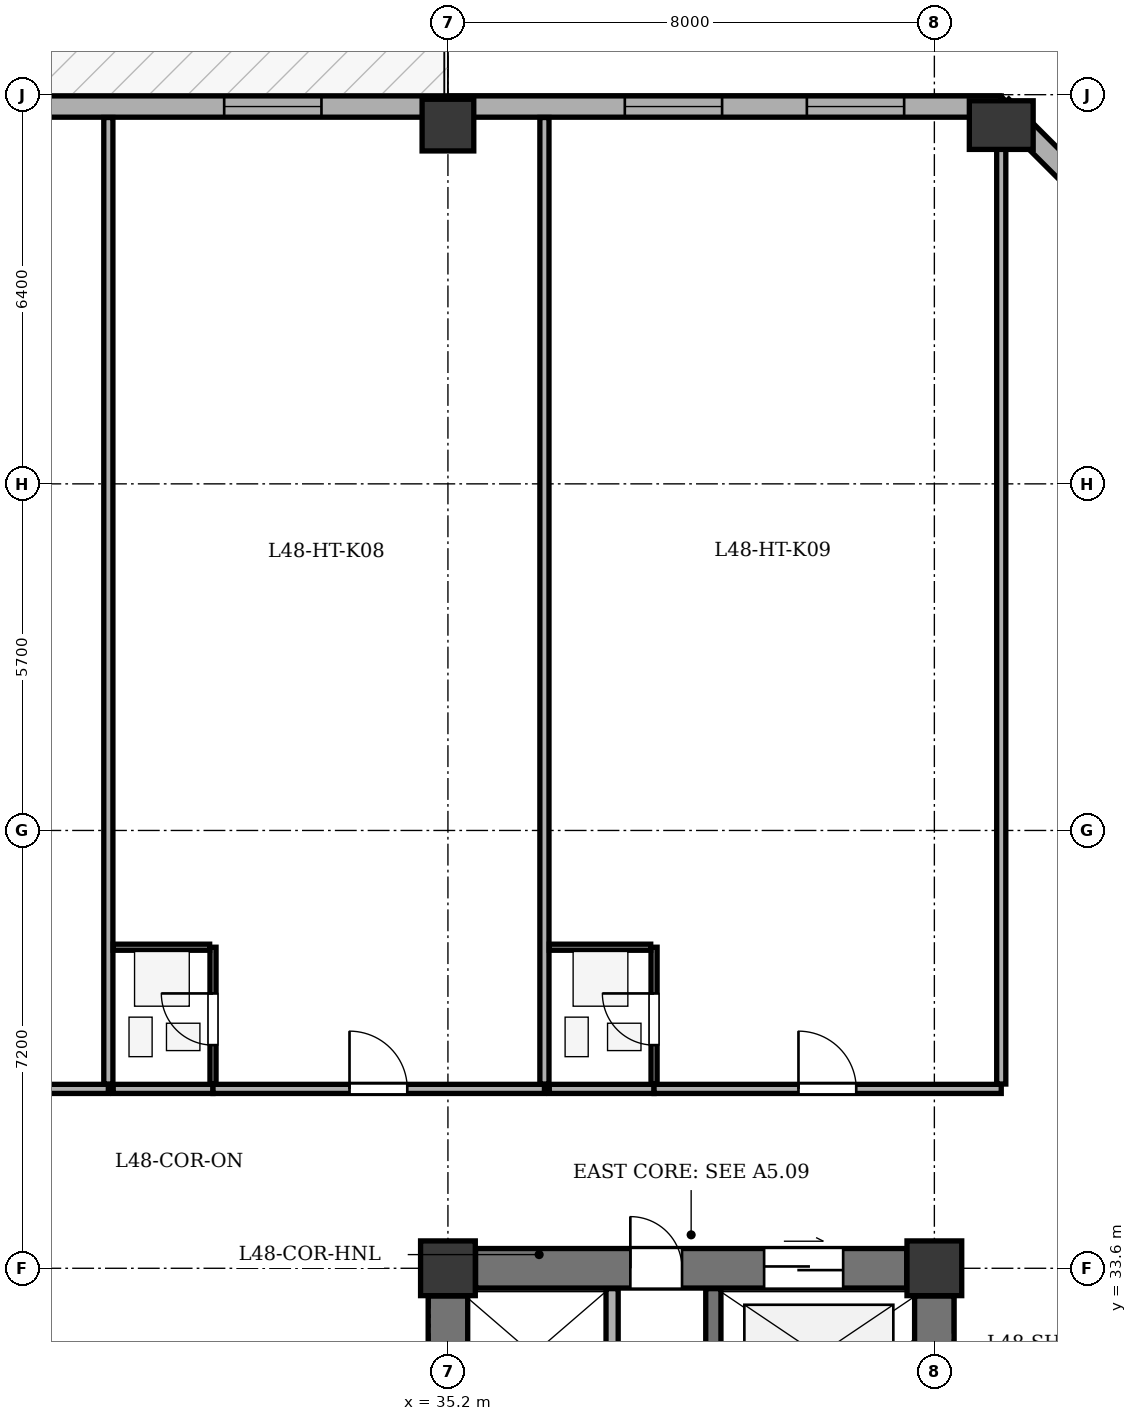
"""IFC4 building model, lengths in metres.
Left out: names, types, materials, properties, quantities, classifications, styles, units other than length and angle.
Written with IfcOpenShell. Run it as: python <this file> out.ifc"""

import sys

from ifc_helpers import new_model, si_unit, direction, frame, frame_2d, origin, origin_2d, place, context, subcontext, project, spatial, rectangle, extrude, element, fill, save


model = new_model("IFC4")
c1 = context("Model", 3, precision=1e-05, world=origin(), true_north=direction((0.0, 1.0)))
c2 = subcontext(c1, "Body", "Model", "MODEL_VIEW")
j1 = project(units=[si_unit("LENGTHUNIT", "METRE"), si_unit("PLANEANGLEUNIT", "RADIAN")], contexts=[c1])
p1 = place(None, origin())
s1 = spatial("IfcSite", under=j1, at=p1, CompositionType="ELEMENT")
p2 = place(p1, origin())
s2 = spatial("IfcBuilding", under=s1, at=p2, CompositionType="ELEMENT")
p3 = place(p2, frame((0.0, 0.0, 186.8)))
s3 = spatial("IfcBuildingStorey", under=s2, at=p3, CompositionType="ELEMENT", Elevation=186.8)
for number, where, z_axis, x_axis in (
    (1, (35.2, 33.6, 0.0), (0.0, 0.0, 1.0), (1.0, 0.0, 0.0)),
    (2, (43.2, 33.6, 0.0), (0.0, 0.0, 1.0), (1.0, 0.0, 0.0)),
):
    element("IfcColumn", number, at=place(p3, frame(where, z_axis=z_axis, x_axis=x_axis)), inside=s3, PredefinedType="COLUMN", context=c2, shape_type="SweptSolid", body=[
        extrude(rectangle(XDim=0.9, YDim=0.9, at=origin_2d()), origin(), (0.0, 0.0, 1.0), 3.5),
    ])
p4 = place(p3, frame((35.2, 52.4, 0.0), z_axis=(0.0, 0.0, 1.0), x_axis=(1.0, 0.0, 0.0)))
e3 = element("IfcColumn", 3, at=p4, inside=s3, PredefinedType="COLUMN", context=c2, shape_type="SweptSolid", body=[
    extrude(rectangle(XDim=0.85, YDim=0.85, at=origin_2d()), origin(), (0.0, 0.0, 1.0), 3.5),
])
p5 = place(p3, frame((44.3, 52.4, 0.0), z_axis=(0.0, 0.0, 1.0), x_axis=(1.0, 0.0, 0.0)))
e4 = element("IfcColumn", 4, at=p5, inside=s3, PredefinedType="COLUMN", context=c2, shape_type="SweptSolid", body=[
    extrude(rectangle(XDim=0.8, YDim=1.05, at=origin_2d()), origin(), (0.0, 0.0, 1.0), 3.5),
])
p6 = place(p3, frame((9.3, 52.705, 0.0), z_axis=(0.0, 0.0, 1.0), x_axis=(1.0, 0.0, 0.0)))
e5 = element("IfcWall", 5, at=p6, inside=s3, PredefinedType="STANDARD", context=c2, shape_type="SweptSolid", body=[
    extrude(rectangle(XDim=35.0, YDim=0.35, at=frame_2d((17.5, 0.0))), origin(), (0.0, 0.0, 1.0), 2.785),
])
p7 = place(p6, frame((14.4, 0.0, 0.0)))
e6 = element("IfcOpeningElement", 6, at=p7, cuts=e5, PredefinedType="OPENING", context=c2, shape_type="SweptSolid", body=[
    extrude(rectangle(XDim=1.0, YDim=2.02, at=frame_2d((0.5, 1.01))), frame((0.0, 0.185, 0.0), z_axis=(0.0, -1.0, 0.0), x_axis=(1.0, 0.0, 0.0)), (0.0, 0.0, 1.0), 0.37),
])
p8 = place(p6, frame((3.123, 0.0, 0.75)))
e7 = element("IfcOpeningElement", 7, at=p8, cuts=e5, PredefinedType="OPENING", context=c2, shape_type="SweptSolid", body=[
    extrude(rectangle(XDim=1.6, YDim=1.75, at=frame_2d((0.8, 0.875))), frame((0.0, 0.185, 0.0), z_axis=(0.0, -1.0, 0.0), x_axis=(1.0, 0.0, 0.0)), (0.0, 0.0, 1.0), 0.37),
])
p9 = place(p6, frame((8.361, 0.0, 0.75)))
e8 = element("IfcOpeningElement", 8, at=p9, cuts=e5, PredefinedType="OPENING", context=c2, shape_type="SweptSolid", body=[
    extrude(rectangle(XDim=1.6, YDim=1.75, at=frame_2d((0.8, 0.875))), frame((0.0, 0.185, 0.0), z_axis=(0.0, -1.0, 0.0), x_axis=(1.0, 0.0, 0.0)), (0.0, 0.0, 1.0), 0.37),
])
p10 = place(p6, frame((22.22, 0.0, 0.75)))
e9 = element("IfcOpeningElement", 9, at=p10, cuts=e5, PredefinedType="OPENING", context=c2, shape_type="SweptSolid", body=[
    extrude(rectangle(XDim=1.6, YDim=1.75, at=frame_2d((0.8, 0.875))), frame((0.0, 0.185, 0.0), z_axis=(0.0, -1.0, 0.0), x_axis=(1.0, 0.0, 0.0)), (0.0, 0.0, 1.0), 0.37),
])
p11 = place(p6, frame((28.809, 0.0, 0.75)))
e10 = element("IfcOpeningElement", 10, at=p11, cuts=e5, PredefinedType="OPENING", context=c2, shape_type="SweptSolid", body=[
    extrude(rectangle(XDim=1.6, YDim=1.75, at=frame_2d((0.8, 0.875))), frame((0.0, 0.185, 0.0), z_axis=(0.0, -1.0, 0.0), x_axis=(1.0, 0.0, 0.0)), (0.0, 0.0, 1.0), 0.37),
])
p12 = place(p6, frame((31.803, 0.0, 0.75)))
e11 = element("IfcOpeningElement", 11, at=p12, cuts=e5, PredefinedType="OPENING", context=c2, shape_type="SweptSolid", body=[
    extrude(rectangle(XDim=1.6, YDim=1.75, at=frame_2d((0.8, 0.875))), frame((0.0, 0.185, 0.0), z_axis=(0.0, -1.0, 0.0), x_axis=(1.0, 0.0, 0.0)), (0.0, 0.0, 1.0), 0.37),
])
p13 = place(p3, frame((44.3, 52.705, 0.0), z_axis=(0.0, 0.0, 1.0), x_axis=(0.707088817216, -0.7071247447, 0.0)))
e12 = element("IfcWall", 12, at=p13, inside=s3, PredefinedType="STANDARD", context=c2, shape_type="SweptSolid", body=[
    extrude(rectangle(XDim=6.795, YDim=0.35, at=frame_2d((3.398, 0.0))), origin(), (0.0, 0.0, 1.0), 2.785),
])
p14 = place(p13, frame((2.698, 0.0, 0.75)))
e13 = element("IfcOpeningElement", 13, at=p14, cuts=e12, PredefinedType="OPENING", context=c2, shape_type="SweptSolid", body=[
    extrude(rectangle(XDim=1.4, YDim=1.65, at=frame_2d((0.7, 0.825))), frame((0.0, 0.185, 0.0), z_axis=(0.0, -1.0, 0.0), x_axis=(1.0, 0.0, 0.0)), (0.0, 0.0, 1.0), 0.37),
])
p15 = place(p3, frame((43.2, 21.255, 0.0), z_axis=(0.0, 0.0, 1.0), x_axis=(0.0, 1.0, 0.0)))
e14 = element("IfcWall", 14, at=p15, inside=s3, PredefinedType="SHEAR", context=c2, shape_type="SweptSolid", body=[
    extrude(rectangle(XDim=11.89, YDim=0.65, at=frame_2d((5.945, 0.0))), origin(), (0.0, 0.0, 1.0), 3.2),
])
p16 = place(p3, frame((35.655, 33.6, 0.0), z_axis=(0.0, 0.0, 1.0), x_axis=(1.0, 0.0, 0.0)))
e15 = element("IfcWall", 15, at=p16, inside=s3, PredefinedType="SHEAR", context=c2, shape_type="SweptSolid", body=[
    extrude(rectangle(XDim=7.09, YDim=0.65, at=frame_2d((3.545, 0.0))), origin(), (0.0, 0.0, 1.0), 3.2),
])
p17 = place(p16, frame((4.745, 0.0, 0.0)))
e16 = element("IfcOpeningElement", 16, at=p17, cuts=e15, PredefinedType="OPENING", context=c2, shape_type="SweptSolid", body=[
    extrude(rectangle(XDim=1.3, YDim=2.15, at=frame_2d((0.65, 1.075))), frame((0.0, 0.335, 0.0), z_axis=(0.0, -1.0, 0.0), x_axis=(1.0, 0.0, 0.0)), (0.0, 0.0, 1.0), 0.67),
])
p18 = place(p16, frame((2.545, 0.0, 0.0)))
e17 = element("IfcOpeningElement", 17, at=p18, cuts=e15, PredefinedType="OPENING", context=c2, shape_type="SweptSolid", body=[
    extrude(rectangle(XDim=0.85, YDim=2.02, at=frame_2d((0.425, 1.01))), frame((0.0, 0.335, 0.0), z_axis=(0.0, -1.0, 0.0), x_axis=(1.0, 0.0, 0.0)), (0.0, 0.0, 1.0), 0.67),
])
p19 = place(p3, frame((35.2, 21.255, 0.0), z_axis=(0.0, 0.0, 1.0), x_axis=(0.0, 1.0, 0.0)))
e18 = element("IfcWall", 18, at=p19, inside=s3, PredefinedType="SHEAR", context=c2, shape_type="SweptSolid", body=[
    extrude(rectangle(XDim=11.89, YDim=0.65, at=frame_2d((5.945, 0.0))), origin(), (0.0, 0.0, 1.0), 3.2),
])
p20 = place(p19, frame((1.345, 0.0, 0.0)))
e19 = element("IfcOpeningElement", 19, at=p20, cuts=e18, PredefinedType="OPENING", context=c2, shape_type="SweptSolid", body=[
    extrude(rectangle(XDim=1.2, YDim=2.15, at=frame_2d((0.6, 1.075))), frame((0.0, 0.335, 0.0), z_axis=(0.0, -1.0, 0.0), x_axis=(1.0, 0.0, 0.0)), (0.0, 0.0, 1.0), 0.67),
])
p21 = place(p19, frame((4.345, 0.0, 0.0)))
e20 = element("IfcOpeningElement", 20, at=p21, cuts=e18, PredefinedType="OPENING", context=c2, shape_type="SweptSolid", body=[
    extrude(rectangle(XDim=1.1, YDim=2.1, at=frame_2d((0.55, 1.05))), frame((0.0, 0.335, 0.0), z_axis=(0.0, -1.0, 0.0), x_axis=(1.0, 0.0, 0.0)), (0.0, 0.0, 1.0), 0.67),
])
p22 = place(p19, frame((6.295, 0.0, 0.0)))
e21 = element("IfcOpeningElement", 21, at=p22, cuts=e18, PredefinedType="OPENING", context=c2, shape_type="SweptSolid", body=[
    extrude(rectangle(XDim=1.1, YDim=2.1, at=frame_2d((0.55, 1.05))), frame((0.0, 0.335, 0.0), z_axis=(0.0, -1.0, 0.0), x_axis=(1.0, 0.0, 0.0)), (0.0, 0.0, 1.0), 0.67),
])
p23 = place(p19, frame((8.245, 0.0, 0.0)))
e22 = element("IfcOpeningElement", 22, at=p23, cuts=e18, PredefinedType="OPENING", context=c2, shape_type="SweptSolid", body=[
    extrude(rectangle(XDim=1.1, YDim=2.1, at=frame_2d((0.55, 1.05))), frame((0.0, 0.335, 0.0), z_axis=(0.0, -1.0, 0.0), x_axis=(1.0, 0.0, 0.0)), (0.0, 0.0, 1.0), 0.67),
])
p24 = place(p3, frame((39.565, 21.135, 0.0), z_axis=(0.0, 0.0, 1.0), x_axis=(0.0, 1.0, 0.0)))
e23 = element("IfcWall", 23, at=p24, inside=s3, PredefinedType="SHEAR", context=c2, shape_type="SweptSolid", body=[
    extrude(rectangle(XDim=12.13, YDim=0.25, at=frame_2d((6.065, 0.0))), origin(), (0.0, 0.0, 1.0), 3.2),
])
p25 = place(p24, frame((0.515, 0.0, 0.0)))
e24 = element("IfcOpeningElement", 24, at=p25, cuts=e23, PredefinedType="OPENING", context=c2, shape_type="SweptSolid", body=[
    extrude(rectangle(XDim=1.2, YDim=2.15, at=frame_2d((0.6, 1.075))), frame((0.0, 0.135, 0.0), z_axis=(0.0, -1.0, 0.0), x_axis=(1.0, 0.0, 0.0)), (0.0, 0.0, 1.0), 0.27),
])
p26 = place(p24, frame((2.665, 0.0, 0.0)))
e25 = element("IfcOpeningElement", 25, at=p26, cuts=e23, PredefinedType="OPENING", context=c2, shape_type="SweptSolid", body=[
    extrude(rectangle(XDim=1.15, YDim=2.15, at=frame_2d((0.575, 1.075))), frame((0.0, 0.135, 0.0), z_axis=(0.0, -1.0, 0.0), x_axis=(1.0, 0.0, 0.0)), (0.0, 0.0, 1.0), 0.27),
])
p27 = place(p3, frame((37.9, 25.27, 0.0), z_axis=(0.0, 0.0, 1.0), x_axis=(0.0, 1.0, 0.0)))
e26 = element("IfcWall", 26, at=p27, inside=s3, PredefinedType="SOLIDWALL", context=c2, shape_type="SweptSolid", body=[
    extrude(rectangle(XDim=7.995, YDim=0.2, at=frame_2d((3.998, 0.0))), origin(), (0.0, 0.0, 1.0), 3.2),
])
p28 = place(p3, frame((24.435, 36.55, 0.0), z_axis=(0.0, 0.0, 1.0), x_axis=(1.0, 0.0, 0.0)))
e27 = element("IfcWall", 27, at=p28, inside=s3, PredefinedType="PARTITIONING", context=c2, shape_type="SweptSolid", body=[
    extrude(rectangle(XDim=5.18, YDim=0.15, at=frame_2d((2.59, 0.0))), origin(), (0.0, 0.0, 1.0), 3.2),
])
p29 = place(p28, frame((2.11, 0.0, 0.0)))
e28 = element("IfcOpeningElement", 28, at=p29, cuts=e27, PredefinedType="OPENING", context=c2, shape_type="SweptSolid", body=[
    extrude(rectangle(XDim=0.95, YDim=2.1, at=frame_2d((0.475, 1.05))), frame((0.0, 0.085, 0.0), z_axis=(0.0, -1.0, 0.0), x_axis=(1.0, 0.0, 0.0)), (0.0, 0.0, 1.0), 0.17),
])
p30 = place(p3, frame((29.615, 36.63, 0.0), z_axis=(0.0, 0.0, 1.0), x_axis=(0.0, 1.0, 0.0)))
e29 = element("IfcWall", 29, at=p30, inside=s3, PredefinedType="PARTITIONING", context=c2, shape_type="SweptSolid", body=[
    extrude(rectangle(XDim=15.895, YDim=0.15, at=frame_2d((7.948, 0.0))), origin(), (0.0, 0.0, 1.0), 2.785),
])
p31 = place(p3, frame((29.695, 36.55, 0.0), z_axis=(0.0, 0.0, 1.0), x_axis=(1.0, 0.0, 0.0)))
e30 = element("IfcWall", 30, at=p31, inside=s3, PredefinedType="PARTITIONING", context=c2, shape_type="SweptSolid", body=[
    extrude(rectangle(XDim=1.641, YDim=0.15, at=frame_2d((0.821, 0.0))), origin(), (0.0, 0.0, 1.0), 3.2),
])
p32 = place(p3, frame((31.336, 36.55, 0.0), z_axis=(0.0, 0.0, 1.0), x_axis=(1.0, 0.0, 0.0)))
e31 = element("IfcWall", 31, at=p32, inside=s3, PredefinedType="PARTITIONING", context=c2, shape_type="SweptSolid", body=[
    extrude(rectangle(XDim=5.451, YDim=0.15, at=frame_2d((2.726, 0.0))), origin(), (0.0, 0.0, 1.0), 3.2),
])
p33 = place(p32, frame((2.245, 0.0, 0.0)))
e32 = element("IfcOpeningElement", 32, at=p33, cuts=e31, PredefinedType="OPENING", context=c2, shape_type="SweptSolid", body=[
    extrude(rectangle(XDim=0.95, YDim=2.1, at=frame_2d((0.475, 1.05))), frame((0.0, 0.085, 0.0), z_axis=(0.0, -1.0, 0.0), x_axis=(1.0, 0.0, 0.0)), (0.0, 0.0, 1.0), 0.17),
])
p34 = place(p3, frame((31.336, 36.63, 0.0), z_axis=(0.0, 0.0, 1.0), x_axis=(0.0, 1.0, 0.0)))
e33 = element("IfcWall", 33, at=p34, inside=s3, PredefinedType="PARTITIONING", context=c2, shape_type="SweptSolid", body=[
    extrude(rectangle(XDim=2.25, YDim=0.1, at=frame_2d((1.125, 0.0))), origin(), (0.0, 0.0, 1.0), 3.2),
])
p35 = place(p34, frame((0.64, 0.0, 0.0)))
e34 = element("IfcOpeningElement", 34, at=p35, cuts=e33, PredefinedType="OPENING", context=c2, shape_type="SweptSolid", body=[
    extrude(rectangle(XDim=0.85, YDim=2.05, at=frame_2d((0.425, 1.025))), frame((0.0, 0.06, 0.0), z_axis=(0.0, -1.0, 0.0), x_axis=(1.0, 0.0, 0.0)), (0.0, 0.0, 1.0), 0.12),
])
p36 = place(p3, frame((29.695, 38.88, 0.0), z_axis=(0.0, 0.0, 1.0), x_axis=(1.0, 0.0, 0.0)))
e35 = element("IfcWall", 35, at=p36, inside=s3, PredefinedType="PARTITIONING", context=c2, shape_type="SweptSolid", body=[
    extrude(rectangle(XDim=1.586, YDim=0.1, at=frame_2d((0.793, 0.0))), origin(), (0.0, 0.0, 1.0), 3.2),
])
p37 = place(p3, frame((36.787, 36.63, 0.0), z_axis=(0.0, 0.0, 1.0), x_axis=(0.0, 1.0, 0.0)))
e36 = element("IfcWall", 36, at=p37, inside=s3, PredefinedType="PARTITIONING", context=c2, shape_type="SweptSolid", body=[
    extrude(rectangle(XDim=15.895, YDim=0.15, at=frame_2d((7.948, 0.0))), origin(), (0.0, 0.0, 1.0), 3.2),
])
p38 = place(p3, frame((36.867, 36.55, 0.0), z_axis=(0.0, 0.0, 1.0), x_axis=(1.0, 0.0, 0.0)))
e37 = element("IfcWall", 37, at=p38, inside=s3, PredefinedType="PARTITIONING", context=c2, shape_type="SweptSolid", body=[
    extrude(rectangle(XDim=1.723, YDim=0.15, at=frame_2d((0.862, 0.0))), origin(), (0.0, 0.0, 1.0), 3.2),
])
p39 = place(p3, frame((38.59, 36.55, 0.0), z_axis=(0.0, 0.0, 1.0), x_axis=(1.0, 0.0, 0.0)))
e38 = element("IfcWall", 38, at=p39, inside=s3, PredefinedType="PARTITIONING", context=c2, shape_type="SweptSolid", body=[
    extrude(rectangle(XDim=5.71, YDim=0.15, at=frame_2d((2.855, 0.0))), origin(), (0.0, 0.0, 1.0), 3.2),
])
p40 = place(p39, frame((2.375, 0.0, 0.0)))
e39 = element("IfcOpeningElement", 39, at=p40, cuts=e38, PredefinedType="OPENING", context=c2, shape_type="SweptSolid", body=[
    extrude(rectangle(XDim=0.95, YDim=2.1, at=frame_2d((0.475, 1.05))), frame((0.0, 0.085, 0.0), z_axis=(0.0, -1.0, 0.0), x_axis=(1.0, 0.0, 0.0)), (0.0, 0.0, 1.0), 0.17),
])
p41 = place(p3, frame((38.59, 36.63, 0.0), z_axis=(0.0, 0.0, 1.0), x_axis=(0.0, 1.0, 0.0)))
e40 = element("IfcWall", 40, at=p41, inside=s3, PredefinedType="PARTITIONING", context=c2, shape_type="SweptSolid", body=[
    extrude(rectangle(XDim=2.25, YDim=0.1, at=frame_2d((1.125, 0.0))), origin(), (0.0, 0.0, 1.0), 3.2),
])
p42 = place(p41, frame((0.64, 0.0, 0.0)))
e41 = element("IfcOpeningElement", 41, at=p42, cuts=e40, PredefinedType="OPENING", context=c2, shape_type="SweptSolid", body=[
    extrude(rectangle(XDim=0.85, YDim=2.05, at=frame_2d((0.425, 1.025))), frame((0.0, 0.06, 0.0), z_axis=(0.0, -1.0, 0.0), x_axis=(1.0, 0.0, 0.0)), (0.0, 0.0, 1.0), 0.12),
])
p43 = place(p3, frame((36.867, 38.88, 0.0), z_axis=(0.0, 0.0, 1.0), x_axis=(1.0, 0.0, 0.0)))
e42 = element("IfcWall", 42, at=p43, inside=s3, PredefinedType="PARTITIONING", context=c2, shape_type="SweptSolid", body=[
    extrude(rectangle(XDim=1.668, YDim=0.1, at=frame_2d((0.834, 0.0))), origin(), (0.0, 0.0, 1.0), 3.2),
])
p44 = place(p3, frame((44.3, 36.63, 0.0), z_axis=(0.0, 0.0, 1.0), x_axis=(0.0, 1.0, 0.0)))
e43 = element("IfcWall", 43, at=p44, inside=s3, PredefinedType="PARTITIONING", context=c2, shape_type="SweptSolid", body=[
    extrude(rectangle(XDim=15.895, YDim=0.15, at=frame_2d((7.948, 0.0))), origin(), (0.0, 0.0, 1.0), 3.2),
])
p45 = place(p10, origin())
e44 = element("IfcWindow", 44, at=p45, inside=s3, PartitioningType="SINGLE_PANEL", PredefinedType="WINDOW", context=c2, shape_type="SweptSolid", body=[
    extrude(rectangle(XDim=1.6, YDim=1.75, at=frame_2d((0.8, 0.875))), frame((0.0, -0.01, 0.0), z_axis=(0.0, -1.0, 0.0), x_axis=(1.0, 0.0, 0.0)), (0.0, 0.0, 1.0), 0.06),
])
fill(e9, e44)
p46 = place(p11, origin())
e45 = element("IfcWindow", 45, at=p46, inside=s3, PartitioningType="SINGLE_PANEL", PredefinedType="WINDOW", context=c2, shape_type="SweptSolid", body=[
    extrude(rectangle(XDim=1.6, YDim=1.75, at=frame_2d((0.8, 0.875))), frame((0.0, -0.01, 0.0), z_axis=(0.0, -1.0, 0.0), x_axis=(1.0, 0.0, 0.0)), (0.0, 0.0, 1.0), 0.06),
])
fill(e10, e45)
p47 = place(p12, origin())
e46 = element("IfcWindow", 46, at=p47, inside=s3, PartitioningType="SINGLE_PANEL", PredefinedType="WINDOW", context=c2, shape_type="SweptSolid", body=[
    extrude(rectangle(XDim=1.6, YDim=1.75, at=frame_2d((0.8, 0.875))), frame((0.0, -0.01, 0.0), z_axis=(0.0, -1.0, 0.0), x_axis=(1.0, 0.0, 0.0)), (0.0, 0.0, 1.0), 0.06),
])
fill(e11, e46)
p48 = place(p17, origin())
e47 = element("IfcDoor", 47, at=p48, inside=s3, OperationType="DOUBLE_DOOR_SLIDING", PredefinedType="DOOR", context=c2, shape_type="SweptSolid", body=[
    extrude(rectangle(XDim=1.3, YDim=2.15, at=frame_2d((0.65, 1.075))), frame((0.0, 0.025, 0.0), z_axis=(0.0, -1.0, 0.0), x_axis=(1.0, 0.0, 0.0)), (0.0, 0.0, 1.0), 0.05),
])
fill(e16, e47)
p49 = place(p18, origin())
e48 = element("IfcDoor", 48, at=p49, inside=s3, OperationType="SINGLE_SWING_LEFT", PredefinedType="DOOR", context=c2, shape_type="SweptSolid", body=[
    extrude(rectangle(XDim=0.85, YDim=2.02, at=frame_2d((0.425, 1.01))), frame((0.0, 0.025, 0.0), z_axis=(0.0, -1.0, 0.0), x_axis=(1.0, 0.0, 0.0)), (0.0, 0.0, 1.0), 0.05),
])
fill(e17, e48)
p50 = place(p35, origin())
e49 = element("IfcDoor", 49, at=p50, inside=s3, OperationType="SINGLE_SWING_RIGHT", PredefinedType="DOOR", context=c2, shape_type="SweptSolid", body=[
    extrude(rectangle(XDim=0.85, YDim=2.05, at=frame_2d((0.425, 1.025))), frame((0.0, 0.025, 0.0), z_axis=(0.0, -1.0, 0.0), x_axis=(1.0, 0.0, 0.0)), (0.0, 0.0, 1.0), 0.05),
])
fill(e34, e49)
p51 = place(p33, origin())
e50 = element("IfcDoor", 50, at=p51, inside=s3, OperationType="SINGLE_SWING_LEFT", PredefinedType="DOOR", context=c2, shape_type="SweptSolid", body=[
    extrude(rectangle(XDim=0.95, YDim=2.1, at=frame_2d((0.475, 1.05))), frame((0.0, 0.025, 0.0), z_axis=(0.0, -1.0, 0.0), x_axis=(1.0, 0.0, 0.0)), (0.0, 0.0, 1.0), 0.05),
])
fill(e32, e50)
p52 = place(p42, origin())
e51 = element("IfcDoor", 51, at=p52, inside=s3, OperationType="SINGLE_SWING_RIGHT", PredefinedType="DOOR", context=c2, shape_type="SweptSolid", body=[
    extrude(rectangle(XDim=0.85, YDim=2.05, at=frame_2d((0.425, 1.025))), frame((0.0, 0.025, 0.0), z_axis=(0.0, -1.0, 0.0), x_axis=(1.0, 0.0, 0.0)), (0.0, 0.0, 1.0), 0.05),
])
fill(e41, e51)
p53 = place(p40, origin())
e52 = element("IfcDoor", 52, at=p53, inside=s3, OperationType="SINGLE_SWING_LEFT", PredefinedType="DOOR", context=c2, shape_type="SweptSolid", body=[
    extrude(rectangle(XDim=0.95, YDim=2.1, at=frame_2d((0.475, 1.05))), frame((0.0, 0.025, 0.0), z_axis=(0.0, -1.0, 0.0), x_axis=(1.0, 0.0, 0.0)), (0.0, 0.0, 1.0), 0.05),
])
fill(e39, e52)
save(model, sys.argv[1])
